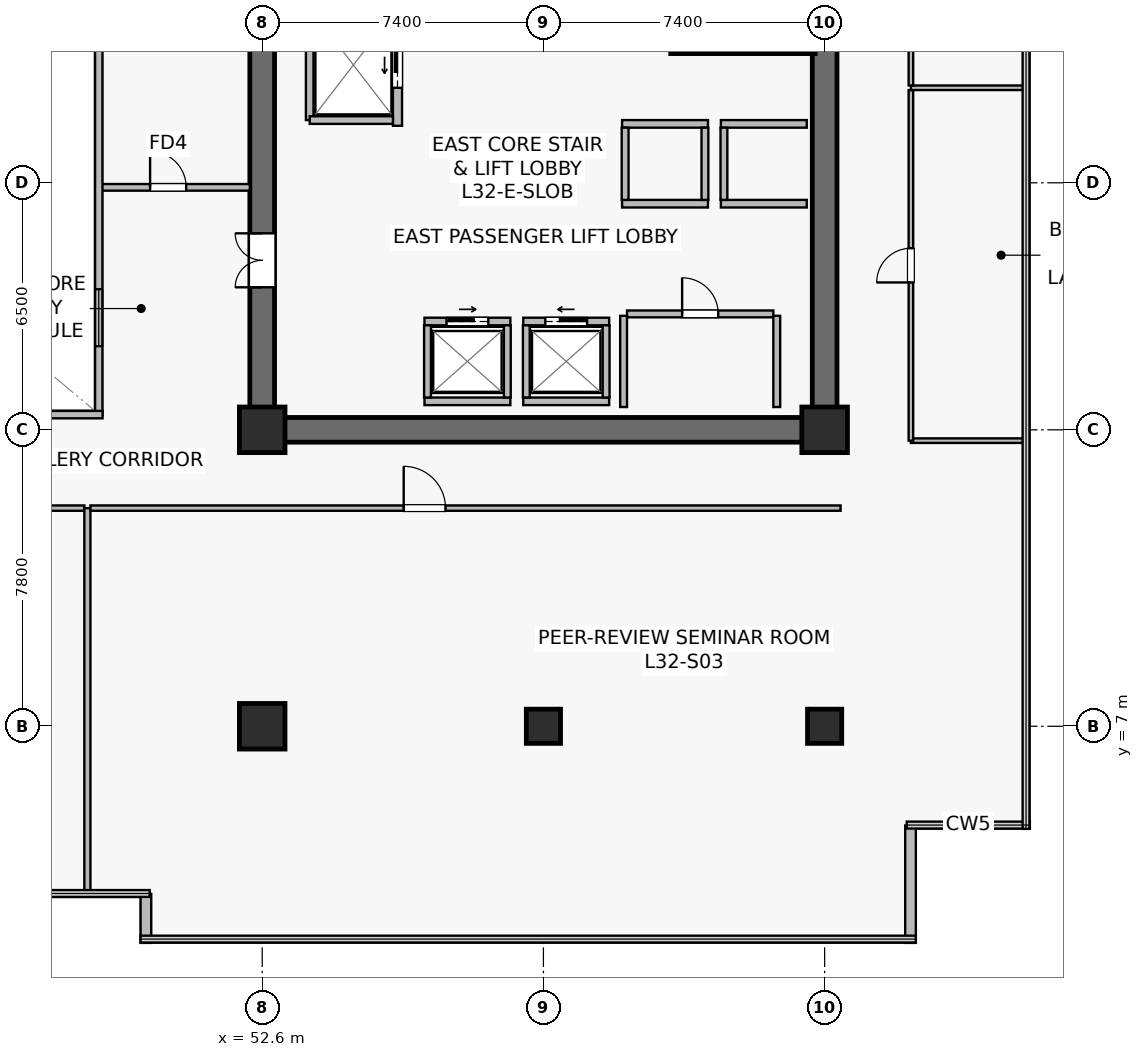
"""IFC4 building model, lengths in metres.
Left out: names, types, materials, properties, quantities, classifications, styles, units other than length and angle.
Written with IfcOpenShell. Run it as: python <this file> out.ifc"""

import sys

from ifc_helpers import new_model, si_unit, direction, frame, frame_2d, origin, origin_2d, place, context, subcontext, project, spatial, rectangle, extrude, source, transform, mapped, element, fill, save


model = new_model("IFC4")
c1 = context("Model", 3, precision=1e-05, world=origin(), true_north=direction((0.0, 1.0)))
c2 = subcontext(c1, "Body", "Model", "MODEL_VIEW")
j1 = project(units=[si_unit("LENGTHUNIT", "METRE"), si_unit("PLANEANGLEUNIT", "RADIAN")], contexts=[c1])
p1 = place(None, origin())
s1 = spatial("IfcSite", under=j1, at=p1, CompositionType="ELEMENT")
p2 = place(p1, origin())
s2 = spatial("IfcBuilding", under=s1, at=p2, CompositionType="ELEMENT")
p3 = place(p2, frame((0.0, 0.0, 133.8)))
s3 = spatial("IfcBuildingStorey", under=s2, at=p3, CompositionType="ELEMENT", Elevation=133.8)
p4 = place(p3, frame((52.275, 14.8, 0.0), z_axis=(0.0, 0.0, 1.0), x_axis=(1.0, 0.0, 0.0)))
e1 = element("IfcWall", 1, at=p4, inside=s3, PredefinedType="SHEAR", context=c2, shape_type="SweptSolid", body=[
    extrude(rectangle(XDim=15.45, YDim=0.65, at=frame_2d((7.725, 0.0))), origin(), (0.0, 0.0, 1.0), 3.79),
])
p5 = place(p3, frame((52.6, 15.125, 0.0), z_axis=(0.0, 0.0, 1.0), x_axis=(0.0, 1.0, 0.0)))
e2 = element("IfcWall", 2, at=p5, inside=s3, PredefinedType="SHEAR", context=c2, shape_type="SweptSolid", body=[
    extrude(rectangle(XDim=18.35, YDim=0.65, at=frame_2d((9.175, 0.0))), origin(), (0.0, 0.0, 1.0), 3.79),
])
p6 = place(p5, frame((3.425, 0.0, 0.0)))
e3 = element("IfcOpeningElement", 3, at=p6, cuts=e2, PredefinedType="OPENING", context=c2, shape_type="SweptSolid", body=[
    extrude(rectangle(XDim=1.42, YDim=2.2, at=frame_2d((0.71, 1.1))), frame((0.0, 0.335, 0.0), z_axis=(0.0, -1.0, 0.0), x_axis=(1.0, 0.0, 0.0)), (0.0, 0.0, 1.0), 0.67),
])
p7 = place(p3, frame((67.4, 15.125, 0.0), z_axis=(0.0, 0.0, 1.0), x_axis=(0.0, 1.0, 0.0)))
e4 = element("IfcWall", 4, at=p7, inside=s3, PredefinedType="SHEAR", context=c2, shape_type="SweptSolid", body=[
    extrude(rectangle(XDim=18.35, YDim=0.65, at=frame_2d((9.175, 0.0))), origin(), (0.0, 0.0, 1.0), 3.79),
])
p8 = place(p3, frame((63.35, 24.85, 0.0), z_axis=(0.0, 0.0, 1.0), x_axis=(1.0, 0.0, 0.0)))
e5 = element("IfcWall", 5, at=p8, inside=s3, PredefinedType="SHEAR", context=c2, shape_type="SweptSolid", body=[
    extrude(rectangle(XDim=3.8, YDim=0.3, at=frame_2d((1.9, 0.0))), origin(), (0.0, 0.0, 1.0), 3.79),
])
m1 = source(origin(), c2, "Body", "SweptSolid", [
    extrude(rectangle(XDim=1.2, YDim=1.2, at=origin_2d()), origin(), (0.0, 0.0, 1.0), 4.1),
])
p9 = place(p3, frame((52.6, 7.0, 0.0), z_axis=(0.0, 0.0, 1.0), x_axis=(1.0, 0.0, 0.0)))
e6 = element("IfcColumn", 6, at=p9, inside=s3, PredefinedType="COLUMN", context=c2, shape_type="MappedRepresentation", body=[
    mapped(m1, transform((0.0, 0.0, 0.0), scale=1.0)),
])
m2 = source(origin(), c2, "Body", "SweptSolid", [
    extrude(rectangle(XDim=0.9, YDim=0.9, at=origin_2d()), origin(), (0.0, 0.0, 1.0), 4.1),
])
p10 = place(p3, frame((60.0, 7.0, 0.0), z_axis=(0.0, 0.0, 1.0), x_axis=(1.0, 0.0, 0.0)))
e7 = element("IfcColumn", 7, at=p10, inside=s3, PredefinedType="COLUMN", context=c2, shape_type="MappedRepresentation", body=[
    mapped(m2, transform((0.0, 0.0, 0.0), scale=1.0)),
])
for number, where, z_axis, x_axis in (
    (8, (52.6, 14.8, 0.0), (0.0, 0.0, 1.0), (1.0, 0.0, 0.0)),
    (9, (67.4, 14.8, 0.0), (0.0, 0.0, 1.0), (1.0, 0.0, 0.0)),
):
    element("IfcColumn", number, at=place(p3, frame(where, z_axis=z_axis, x_axis=x_axis)), inside=s3, PredefinedType="COLUMN", context=c2, shape_type="MappedRepresentation", body=[
        mapped(m1, transform((0.0, 0.0, 0.0), scale=1.0)),
    ])
p11 = place(p3, frame((67.4, 7.0, 0.0), z_axis=(0.0, 0.0, 1.0), x_axis=(1.0, 0.0, 0.0)))
e10 = element("IfcColumn", 10, at=p11, inside=s3, PredefinedType="COLUMN", context=c2, shape_type="MappedRepresentation", body=[
    mapped(m2, transform((0.0, 0.0, 0.0), scale=1.0)),
])
p12 = place(p3, frame((49.54, 2.588, 0.0), z_axis=(0.0, 0.0, 1.0), x_axis=(0.0, -1.0, 0.0)))
e11 = element("IfcWall", 11, at=p12, inside=s3, PredefinedType="STANDARD", context=c2, shape_type="SweptSolid", body=[
    extrude(rectangle(XDim=1.288, YDim=0.28, at=frame_2d((0.644, 0.0))), origin(), (0.0, 0.0, 1.0), 3.79),
])
p13 = place(p3, frame((69.66, 1.3, 0.0), z_axis=(0.0, 0.0, 1.0), x_axis=(0.0, 1.0, 0.0)))
e12 = element("IfcWall", 12, at=p13, inside=s3, PredefinedType="STANDARD", context=c2, shape_type="SweptSolid", body=[
    extrude(rectangle(XDim=3.088, YDim=0.28, at=frame_2d((1.544, 0.0))), origin(), (0.0, 0.0, 1.0), 3.79),
])
p14 = place(p3, frame((56.16, 22.8, 0.0), z_axis=(0.0, 0.0, 1.0), x_axis=(0.0, 1.0, 0.0)))
e13 = element("IfcWall", 13, at=p14, inside=s3, PredefinedType="SOLIDWALL", context=c2, shape_type="SweptSolid", body=[
    extrude(rectangle(XDim=6.85, YDim=0.24, at=frame_2d((3.425, 0.0))), origin(), (0.0, 0.0, 1.0), 2.875),
])
p15 = place(p14, frame((4.85, 0.0, 0.0)))
e14 = element("IfcOpeningElement", 14, at=p15, cuts=e13, PredefinedType="OPENING", context=c2, shape_type="SweptSolid", body=[
    extrude(rectangle(XDim=1.1, YDim=2.22, at=frame_2d((0.55, 1.11))), frame((0.0, 0.13, 0.0), z_axis=(0.0, -1.0, 0.0), x_axis=(1.0, 0.0, 0.0)), (0.0, 0.0, 1.0), 0.26),
])
p16 = place(p14, frame((1.0, 0.0, 0.0)))
e15 = element("IfcOpeningElement", 15, at=p16, cuts=e13, PredefinedType="OPENING", context=c2, shape_type="SweptSolid", body=[
    extrude(rectangle(XDim=1.2, YDim=2.22, at=frame_2d((0.6, 1.11))), frame((0.0, 0.13, 0.0), z_axis=(0.0, -1.0, 0.0), x_axis=(1.0, 0.0, 0.0)), (0.0, 0.0, 1.0), 0.26),
])
p17 = place(p3, frame((59.47, 17.65, 0.0), z_axis=(0.0, 0.0, 1.0), x_axis=(1.0, 0.0, 0.0)))
e16 = element("IfcWall", 16, at=p17, inside=s3, PredefinedType="SOLIDWALL", context=c2, shape_type="SweptSolid", body=[
    extrude(rectangle(XDim=2.26, YDim=0.2, at=frame_2d((1.13, 0.0))), origin(), (0.0, 0.0, 1.0), 3.125),
])
p18 = place(p17, frame((0.58, 0.0, 0.0)))
e17 = element("IfcOpeningElement", 17, at=p18, cuts=e16, PredefinedType="OPENING", context=c2, shape_type="SweptSolid", body=[
    extrude(rectangle(XDim=1.1, YDim=2.22, at=frame_2d((0.55, 1.11))), frame((0.0, 0.11, 0.0), z_axis=(0.0, -1.0, 0.0), x_axis=(1.0, 0.0, 0.0)), (0.0, 0.0, 1.0), 0.22),
])
p19 = place(p3, frame((59.47, 15.55, 0.0), z_axis=(0.0, 0.0, 1.0), x_axis=(1.0, 0.0, 0.0)))
e18 = element("IfcWall", 18, at=p19, inside=s3, PredefinedType="SOLIDWALL", context=c2, shape_type="SweptSolid", body=[
    extrude(rectangle(XDim=2.26, YDim=0.2, at=frame_2d((1.13, 0.0))), origin(), (0.0, 0.0, 1.0), 3.125),
])
for number, where, z_axis, x_axis in (
    (19, (59.55, 15.65, 0.0), (0.0, 0.0, 1.0), (0.0, 1.0, 0.0)),
    (20, (61.65, 15.65, 0.0), (0.0, 0.0, 1.0), (0.0, 1.0, 0.0)),
):
    element("IfcWall", number, at=place(p3, frame(where, z_axis=z_axis, x_axis=x_axis)), inside=s3, PredefinedType="SOLIDWALL", context=c2, shape_type="SweptSolid", body=[
        extrude(rectangle(XDim=1.9, YDim=0.18, at=frame_2d((0.95, 0.0))), origin(), (0.0, 0.0, 1.0), 3.79),
    ])
p20 = place(p3, frame((56.87, 17.65, 0.0), z_axis=(0.0, 0.0, 1.0), x_axis=(1.0, 0.0, 0.0)))
e21 = element("IfcWall", 21, at=p20, inside=s3, PredefinedType="SOLIDWALL", context=c2, shape_type="SweptSolid", body=[
    extrude(rectangle(XDim=2.26, YDim=0.2, at=frame_2d((1.13, 0.0))), origin(), (0.0, 0.0, 1.0), 3.79),
])
p21 = place(p20, frame((0.58, 0.0, 0.0)))
e22 = element("IfcOpeningElement", 22, at=p21, cuts=e21, PredefinedType="OPENING", context=c2, shape_type="SweptSolid", body=[
    extrude(rectangle(XDim=1.1, YDim=2.22, at=frame_2d((0.55, 1.11))), frame((0.0, 0.11, 0.0), z_axis=(0.0, -1.0, 0.0), x_axis=(1.0, 0.0, 0.0)), (0.0, 0.0, 1.0), 0.22),
])
p22 = place(p3, frame((56.87, 15.55, 0.0), z_axis=(0.0, 0.0, 1.0), x_axis=(1.0, 0.0, 0.0)))
e23 = element("IfcWall", 23, at=p22, inside=s3, PredefinedType="SOLIDWALL", context=c2, shape_type="SweptSolid", body=[
    extrude(rectangle(XDim=2.26, YDim=0.2, at=frame_2d((1.13, 0.0))), origin(), (0.0, 0.0, 1.0), 3.79),
])
for number, where, z_axis, x_axis in (
    (24, (56.95, 15.65, 0.0), (0.0, 0.0, 1.0), (0.0, 1.0, 0.0)),
    (25, (59.05, 15.65, 0.0), (0.0, 0.0, 1.0), (0.0, 1.0, 0.0)),
):
    element("IfcWall", number, at=place(p3, frame(where, z_axis=z_axis, x_axis=x_axis)), inside=s3, PredefinedType="SOLIDWALL", context=c2, shape_type="SweptSolid", body=[
        extrude(rectangle(XDim=1.9, YDim=0.18, at=frame_2d((0.95, 0.0))), origin(), (0.0, 0.0, 1.0), 3.79),
    ])
for number, where, z_axis, x_axis in (
    (26, (64.67, 20.75, 0.0), (0.0, 0.0, 1.0), (1.0, 0.0, 0.0)),
    (27, (64.67, 22.85, 0.0), (0.0, 0.0, 1.0), (1.0, 0.0, 0.0)),
):
    element("IfcWall", number, at=place(p3, frame(where, z_axis=z_axis, x_axis=x_axis)), inside=s3, PredefinedType="SOLIDWALL", context=c2, shape_type="SweptSolid", body=[
        extrude(rectangle(XDim=2.26, YDim=0.2, at=frame_2d((1.13, 0.0))), origin(), (0.0, 0.0, 1.0), 3.79),
    ])
p23 = place(p3, frame((64.75, 20.85, 0.0), z_axis=(0.0, 0.0, 1.0), x_axis=(0.0, 1.0, 0.0)))
e28 = element("IfcWall", 28, at=p23, inside=s3, PredefinedType="SOLIDWALL", context=c2, shape_type="SweptSolid", body=[
    extrude(rectangle(XDim=1.9, YDim=0.18, at=frame_2d((0.95, 0.0))), origin(), (0.0, 0.0, 1.0), 3.79),
])
for number, where, z_axis, x_axis in (
    (29, (62.07, 20.75, 0.0), (0.0, 0.0, 1.0), (1.0, 0.0, 0.0)),
    (30, (62.07, 22.85, 0.0), (0.0, 0.0, 1.0), (1.0, 0.0, 0.0)),
):
    element("IfcWall", number, at=place(p3, frame(where, z_axis=z_axis, x_axis=x_axis)), inside=s3, PredefinedType="SOLIDWALL", context=c2, shape_type="SweptSolid", body=[
        extrude(rectangle(XDim=2.26, YDim=0.2, at=frame_2d((1.13, 0.0))), origin(), (0.0, 0.0, 1.0), 3.79),
    ])
for number, where, z_axis, x_axis in (
    (31, (62.15, 20.85, 0.0), (0.0, 0.0, 1.0), (0.0, 1.0, 0.0)),
    (32, (64.25, 20.85, 0.0), (0.0, 0.0, 1.0), (0.0, 1.0, 0.0)),
):
    element("IfcWall", number, at=place(p3, frame(where, z_axis=z_axis, x_axis=x_axis)), inside=s3, PredefinedType="SOLIDWALL", context=c2, shape_type="SweptSolid", body=[
        extrude(rectangle(XDim=1.9, YDim=0.18, at=frame_2d((0.95, 0.0))), origin(), (0.0, 0.0, 1.0), 3.79),
    ])
p24 = place(p3, frame((53.85, 22.95, 0.0), z_axis=(0.0, 0.0, 1.0), x_axis=(0.0, 1.0, 0.0)))
e33 = element("IfcWall", 33, at=p24, inside=s3, PredefinedType="SOLIDWALL", context=c2, shape_type="SweptSolid", body=[
    extrude(rectangle(XDim=2.9, YDim=0.2, at=frame_2d((1.45, 0.0))), origin(), (0.0, 0.0, 1.0), 2.875),
])
p25 = place(p3, frame((53.85, 22.95, 0.0), z_axis=(0.0, 0.0, 1.0), x_axis=(1.0, 0.0, 0.0)))
e34 = element("IfcWall", 34, at=p25, inside=s3, PredefinedType="SOLIDWALL", context=c2, shape_type="SweptSolid", body=[
    extrude(rectangle(XDim=2.19, YDim=0.2, at=frame_2d((1.095, 0.0))), origin(), (0.0, 0.0, 1.0), 3.79),
])
p26 = place(p3, frame((62.2, 17.85, 0.0), z_axis=(0.0, 0.0, 1.0), x_axis=(1.0, 0.0, 0.0)))
e35 = element("IfcWall", 35, at=p26, inside=s3, PredefinedType="SOLIDWALL", context=c2, shape_type="SweptSolid", body=[
    extrude(rectangle(XDim=3.85, YDim=0.18, at=frame_2d((1.925, 0.0))), origin(), (0.0, 0.0, 1.0), 3.79),
])
p27 = place(p26, frame((1.45, 0.0, 0.0)))
e36 = element("IfcOpeningElement", 36, at=p27, cuts=e35, PredefinedType="OPENING", context=c2, shape_type="SweptSolid", body=[
    extrude(rectangle(XDim=0.95, YDim=2.15, at=frame_2d((0.475, 1.075))), frame((0.0, 0.1, 0.0), z_axis=(0.0, -1.0, 0.0), x_axis=(1.0, 0.0, 0.0)), (0.0, 0.0, 1.0), 0.2),
])
for number, where, z_axis, x_axis in (
    (37, (62.11, 15.4, 0.0), (0.0, 0.0, 1.0), (0.0, 1.0, 0.0)),
    (38, (66.14, 15.4, 0.0), (0.0, 0.0, 1.0), (0.0, 1.0, 0.0)),
):
    element("IfcWall", number, at=place(p3, frame(where, z_axis=z_axis, x_axis=x_axis)), inside=s3, PredefinedType="SOLIDWALL", context=c2, shape_type="SweptSolid", body=[
        extrude(rectangle(XDim=2.4, YDim=0.18, at=frame_2d((1.2, 0.0))), origin(), (0.0, 0.0, 1.0), 3.79),
    ])
p28 = place(p3, frame((48.3, 21.18, 0.0), z_axis=(0.0, 0.0, 1.0), x_axis=(1.0, 0.0, 0.0)))
e39 = element("IfcWall", 39, at=p28, inside=s3, PredefinedType="PARTITIONING", context=c2, shape_type="SweptSolid", body=[
    extrude(rectangle(XDim=3.975, YDim=0.175, at=frame_2d((1.987, 0.0))), origin(), (0.0, 0.0, 1.0), 3.79),
])
p29 = place(p28, frame((1.35, 0.0, 0.0)))
e40 = element("IfcOpeningElement", 40, at=p29, cuts=e39, PredefinedType="OPENING", context=c2, shape_type="SweptSolid", body=[
    extrude(rectangle(XDim=0.95, YDim=2.15, at=frame_2d((0.475, 1.075))), frame((0.0, 0.098, 0.0), z_axis=(0.0, -1.0, 0.0), x_axis=(1.0, 0.0, 0.0)), (0.0, 0.0, 1.0), 0.195),
])
p30 = place(p3, frame((48.3, 15.2, 0.0), z_axis=(0.0, 0.0, 1.0), x_axis=(0.0, 1.0, 0.0)))
e41 = element("IfcWall", 41, at=p30, inside=s3, PredefinedType="SOLIDWALL", context=c2, shape_type="SweptSolid", body=[
    extrude(rectangle(XDim=18.2, YDim=0.195, at=frame_2d((9.1, 0.0))), origin(), (0.0, 0.0, 1.0), 3.79),
])
p31 = place(p30, frame((1.8, 0.0, 0.9)))
e42 = element("IfcOpeningElement", 42, at=p31, cuts=e41, PredefinedType="OPENING", context=c2, shape_type="SweptSolid", body=[
    extrude(rectangle(XDim=1.5, YDim=1.4, at=frame_2d((0.75, 0.7))), frame((0.0, 0.107, 0.0), z_axis=(0.0, -1.0, 0.0), x_axis=(1.0, 0.0, 0.0)), (0.0, 0.0, 1.0), 0.215),
])
p32 = place(p30, frame((13.2, 0.0, 0.9)))
e43 = element("IfcOpeningElement", 43, at=p32, cuts=e41, PredefinedType="OPENING", context=c2, shape_type="SweptSolid", body=[
    extrude(rectangle(XDim=1.5, YDim=1.4, at=frame_2d((0.75, 0.7))), frame((0.0, 0.107, 0.0), z_axis=(0.0, -1.0, 0.0), x_axis=(1.0, 0.0, 0.0)), (0.0, 0.0, 1.0), 0.215),
])
p33 = place(p3, frame((26.4, 15.2, 0.0), z_axis=(0.0, 0.0, 1.0), x_axis=(1.0, 0.0, 0.0)))
e44 = element("IfcWall", 44, at=p33, inside=s3, PredefinedType="SOLIDWALL", context=c2, shape_type="SweptSolid", body=[
    extrude(rectangle(XDim=22.0, YDim=0.195, at=frame_2d((11.0, 0.0))), origin(), (0.0, 0.0, 1.0), 3.79),
])
p34 = place(p3, frame((24.28, 12.74, 0.0), z_axis=(0.0, 0.0, 1.0), x_axis=(1.0, 0.0, 0.0)))
e45 = element("IfcWall", 45, at=p34, inside=s3, PredefinedType="PARTITIONING", context=c2, shape_type="SweptSolid", body=[
    extrude(rectangle(XDim=23.64, YDim=0.14, at=frame_2d((11.82, 0.0))), origin(), (0.0, 0.0, 1.0), 3.125),
])
p35 = place(p34, frame((12.58, 0.0, 0.0)))
e46 = element("IfcOpeningElement", 46, at=p35, cuts=e45, PredefinedType="OPENING", context=c2, shape_type="SweptSolid", body=[
    extrude(rectangle(XDim=1.1, YDim=2.18, at=frame_2d((0.55, 1.09))), frame((0.0, 0.08, 0.0), z_axis=(0.0, -1.0, 0.0), x_axis=(1.0, 0.0, 0.0)), (0.0, 0.0, 1.0), 0.16),
])
p36 = place(p3, frame((48.0, 2.61, 0.0), z_axis=(0.0, 0.0, 1.0), x_axis=(0.0, 1.0, 0.0)))
e47 = element("IfcWall", 47, at=p36, inside=s3, PredefinedType="PARTITIONING", context=c2, shape_type="SweptSolid", body=[
    extrude(rectangle(XDim=10.13, YDim=0.16, at=frame_2d((5.065, 0.0))), origin(), (0.0, 0.0, 1.0), 3.075),
])
p37 = place(p3, frame((48.08, 12.74, 0.0), z_axis=(0.0, 0.0, 1.0), x_axis=(1.0, 0.0, 0.0)))
e48 = element("IfcWall", 48, at=p37, inside=s3, PredefinedType="PARTITIONING", context=c2, shape_type="SweptSolid", body=[
    extrude(rectangle(XDim=19.74, YDim=0.14, at=frame_2d((9.87, 0.0))), origin(), (0.0, 0.0, 1.0), 3.125),
])
p38 = place(p37, frame((8.244, 0.0, 0.0)))
e49 = element("IfcOpeningElement", 49, at=p38, cuts=e48, PredefinedType="OPENING", context=c2, shape_type="SweptSolid", body=[
    extrude(rectangle(XDim=1.1, YDim=2.18, at=frame_2d((0.55, 1.09))), frame((0.0, 0.08, 0.0), z_axis=(0.0, -1.0, 0.0), x_axis=(1.0, 0.0, 0.0)), (0.0, 0.0, 1.0), 0.16),
])
p39 = place(p3, frame((69.67, 14.515, 0.0), z_axis=(0.0, 0.0, 1.0), x_axis=(1.0, 0.0, 0.0)))
e50 = element("IfcWall", 50, at=p39, inside=s3, PredefinedType="PARTITIONING", context=c2, shape_type="SweptSolid", body=[
    extrude(rectangle(XDim=3.02, YDim=0.12, at=frame_2d((1.51, 0.0))), origin(), (0.0, 0.0, 1.0), 3.79),
])
p40 = place(p3, frame((69.67, 14.515, 0.0), z_axis=(0.0, 0.0, 1.0), x_axis=(0.0, 1.0, 0.0)))
e51 = element("IfcWall", 51, at=p40, inside=s3, PredefinedType="PARTITIONING", context=c2, shape_type="SweptSolid", body=[
    extrude(rectangle(XDim=9.225, YDim=0.12, at=frame_2d((4.613, 0.0))), origin(), (0.0, 0.0, 1.0), 3.79),
])
p41 = place(p40, frame((4.163, 0.0, 0.0)))
e52 = element("IfcOpeningElement", 52, at=p41, cuts=e51, PredefinedType="OPENING", context=c2, shape_type="SweptSolid", body=[
    extrude(rectangle(XDim=0.9, YDim=2.1, at=frame_2d((0.45, 1.05))), frame((0.0, 0.07, 0.0), z_axis=(0.0, -1.0, 0.0), x_axis=(1.0, 0.0, 0.0)), (0.0, 0.0, 1.0), 0.14),
])
p42 = place(p3, frame((69.67, 23.8, 0.0), z_axis=(0.0, 0.0, 1.0), x_axis=(1.0, 0.0, 0.0)))
e53 = element("IfcWall", 53, at=p42, inside=s3, PredefinedType="PARTITIONING", context=c2, shape_type="SweptSolid", body=[
    extrude(rectangle(XDim=3.02, YDim=0.12, at=frame_2d((1.51, 0.0))), origin(), (0.0, 0.0, 1.0), 3.79),
])
p43 = place(p3, frame((69.67, 23.86, 0.0), z_axis=(0.0, 0.0, 1.0), x_axis=(0.0, 1.0, 0.0)))
e54 = element("IfcWall", 54, at=p43, inside=s3, PredefinedType="PARTITIONING", context=c2, shape_type="SweptSolid", body=[
    extrude(rectangle(XDim=10.225, YDim=0.12, at=frame_2d((5.112, 0.0))), origin(), (0.0, 0.0, 1.0), 3.79),
])
p44 = place(p43, frame((4.663, 0.0, 0.0)))
e55 = element("IfcOpeningElement", 55, at=p44, cuts=e54, PredefinedType="OPENING", context=c2, shape_type="SweptSolid", body=[
    extrude(rectangle(XDim=0.9, YDim=2.1, at=frame_2d((0.45, 1.05))), frame((0.0, 0.07, 0.0), z_axis=(0.0, -1.0, 0.0), x_axis=(1.0, 0.0, 0.0)), (0.0, 0.0, 1.0), 0.14),
])
m3 = source(origin(), c2, "Body", "SweptSolid", [
    extrude(rectangle(XDim=1.5, YDim=1.4, at=frame_2d((0.75, 0.7))), frame((0.0, 0.03, 0.0), z_axis=(0.0, -1.0, 0.0), x_axis=(1.0, 0.0, 0.0)), (0.0, 0.0, 1.0), 0.06),
])
p45 = place(p31, origin())
e56 = element("IfcWindow", 56, at=p45, inside=s3, PartitioningType="SINGLE_PANEL", PredefinedType="WINDOW", context=c2, shape_type="MappedRepresentation", body=[
    mapped(m3, transform((0.0, 0.0, 0.0), scale=1.0)),
])
fill(e42, e56)
m4 = source(origin(), c2, "Body", "SweptSolid", [
    extrude(rectangle(XDim=1.1, YDim=2.22, at=frame_2d((0.55, 1.11))), frame((0.0, 0.025, 0.0), z_axis=(0.0, -1.0, 0.0), x_axis=(1.0, 0.0, 0.0)), (0.0, 0.0, 1.0), 0.05),
])
p46 = place(p18, origin())
e57 = element("IfcDoor", 57, at=p46, inside=s3, OperationType="SLIDING_TO_LEFT", PredefinedType="USERDEFINED", context=c2, shape_type="MappedRepresentation", body=[
    mapped(m4, transform((0.0, 0.0, 0.0), scale=1.0)),
])
fill(e17, e57)
p47 = place(p21, origin())
e58 = element("IfcDoor", 58, at=p47, inside=s3, OperationType="SLIDING_TO_RIGHT", PredefinedType="USERDEFINED", context=c2, shape_type="MappedRepresentation", body=[
    mapped(m4, transform((0.0, 0.0, 0.0), scale=1.0)),
])
fill(e22, e58)
m5 = source(origin(), c2, "Body", "SweptSolid", [
    extrude(rectangle(XDim=1.2, YDim=2.22, at=frame_2d((0.6, 1.11))), frame((0.0, 0.025, 0.0), z_axis=(0.0, -1.0, 0.0), x_axis=(1.0, 0.0, 0.0)), (0.0, 0.0, 1.0), 0.05),
])
p48 = place(p16, origin())
e59 = element("IfcDoor", 59, at=p48, inside=s3, OperationType="SLIDING_TO_LEFT", PredefinedType="USERDEFINED", context=c2, shape_type="MappedRepresentation", body=[
    mapped(m5, transform((0.0, 0.0, 0.0), scale=1.0)),
])
fill(e15, e59)
m6 = source(origin(), c2, "Body", "SweptSolid", [
    extrude(rectangle(XDim=0.95, YDim=2.15, at=frame_2d((0.475, 1.075))), frame((0.0, 0.025, 0.0), z_axis=(0.0, -1.0, 0.0), x_axis=(1.0, 0.0, 0.0)), (0.0, 0.0, 1.0), 0.05),
])
p49 = place(p27, origin())
e60 = element("IfcDoor", 60, at=p49, inside=s3, OperationType="SINGLE_SWING_LEFT", PredefinedType="DOOR", context=c2, shape_type="MappedRepresentation", body=[
    mapped(m6, transform((0.0, 0.0, 0.0), scale=1.0)),
])
fill(e36, e60)
m7 = source(origin(), c2, "Body", "SweptSolid", [
    extrude(rectangle(XDim=1.42, YDim=2.2, at=frame_2d((0.71, 1.1))), frame((0.0, 0.025, 0.0), z_axis=(0.0, -1.0, 0.0), x_axis=(1.0, 0.0, 0.0)), (0.0, 0.0, 1.0), 0.05),
])
p50 = place(p6, origin())
e61 = element("IfcDoor", 61, at=p50, inside=s3, OperationType="DOUBLE_DOOR_SINGLE_SWING", PredefinedType="DOOR", context=c2, shape_type="MappedRepresentation", body=[
    mapped(m7, transform((0.0, 0.0, 0.0), scale=1.0)),
])
fill(e3, e61)
p51 = place(p29, origin())
e62 = element("IfcDoor", 62, at=p51, inside=s3, OperationType="SINGLE_SWING_LEFT", PredefinedType="DOOR", context=c2, shape_type="MappedRepresentation", body=[
    mapped(m6, transform((0.0, 0.0, 0.0), scale=1.0)),
])
fill(e40, e62)
m8 = source(origin(), c2, "Body", "SweptSolid", [
    extrude(rectangle(XDim=1.1, YDim=2.18, at=frame_2d((0.55, 1.09))), frame((0.0, 0.025, 0.0), z_axis=(0.0, -1.0, 0.0), x_axis=(1.0, 0.0, 0.0)), (0.0, 0.0, 1.0), 0.05),
])
p52 = place(p38, origin())
e63 = element("IfcDoor", 63, at=p52, inside=s3, OperationType="SINGLE_SWING_LEFT", PredefinedType="DOOR", context=c2, shape_type="MappedRepresentation", body=[
    mapped(m8, transform((0.0, 0.0, 0.0), scale=1.0)),
])
fill(e49, e63)
m9 = source(origin(), c2, "Body", "SweptSolid", [
    extrude(rectangle(XDim=0.9, YDim=2.1, at=frame_2d((0.45, 1.05))), frame((0.0, 0.025, 0.0), z_axis=(0.0, -1.0, 0.0), x_axis=(1.0, 0.0, 0.0)), (0.0, 0.0, 1.0), 0.05),
])
p53 = place(p41, origin())
e64 = element("IfcDoor", 64, at=p53, inside=s3, OperationType="SINGLE_SWING_LEFT", PredefinedType="DOOR", context=c2, shape_type="MappedRepresentation", body=[
    mapped(m9, transform((0.0, 0.0, 0.0), scale=1.0)),
])
fill(e52, e64)
save(model, sys.argv[1])
